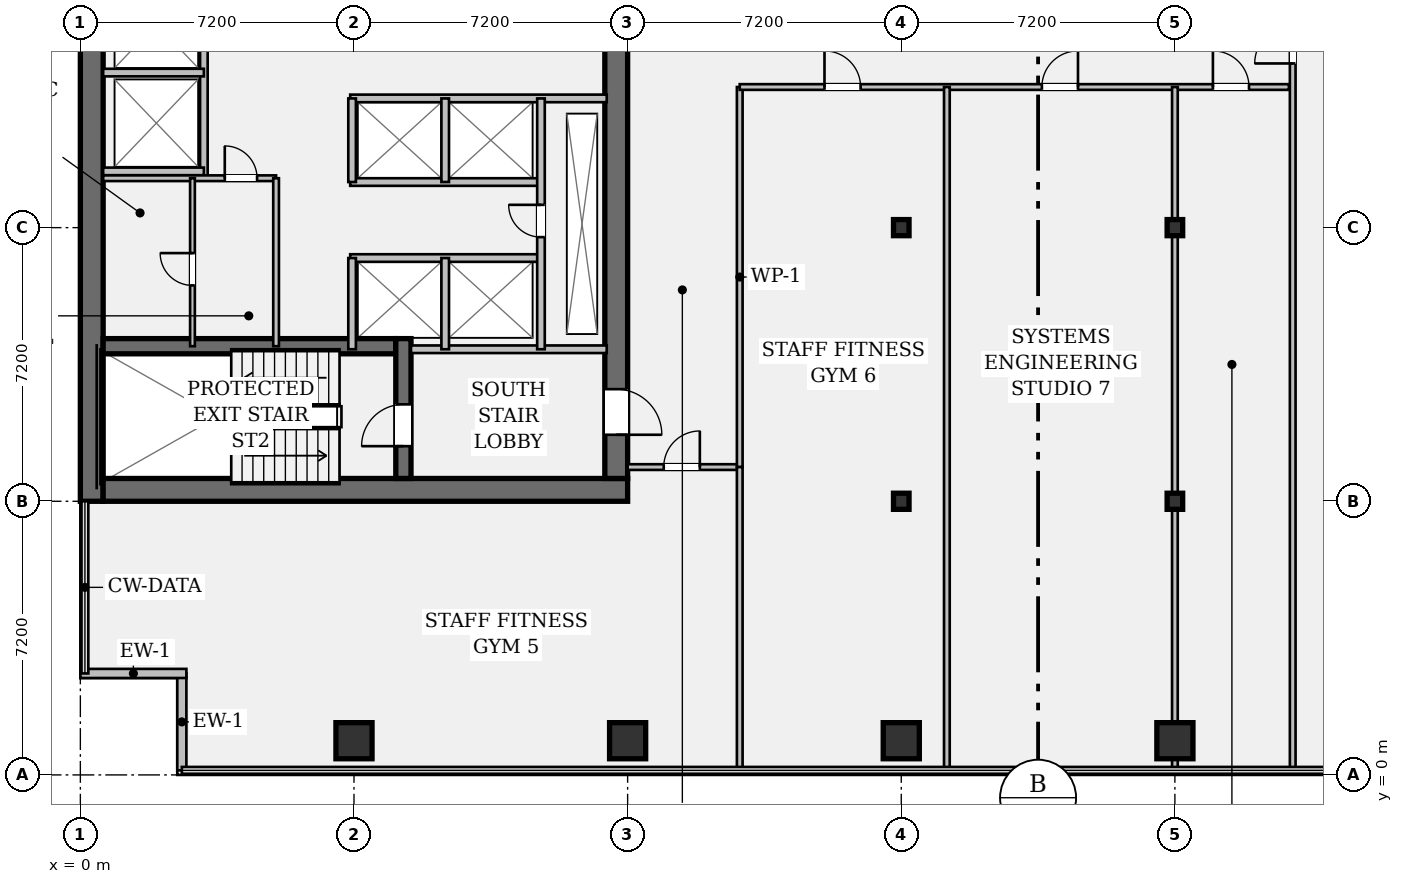
"""IFC4 building model, lengths in metres.
Left out: names, types, materials, properties, quantities, classifications, styles, units other than length and angle.
Written with IfcOpenShell. Run it as: python <this file> out.ifc"""

import sys

from ifc_helpers import new_model, si_unit, direction, frame, frame_2d, origin, origin_2d, place, context, subcontext, project, spatial, rectangle, hollow_rectangle, i_section, extrude, element, fill, save


model = new_model("IFC4")
c1 = context("Model", 3, precision=1e-05, world=origin(), true_north=direction((0.0, 1.0)))
c2 = subcontext(c1, "Body", "Model", "MODEL_VIEW")
j1 = project(units=[si_unit("LENGTHUNIT", "METRE"), si_unit("PLANEANGLEUNIT", "RADIAN")], contexts=[c1])
p1 = place(None, origin())
s1 = spatial("IfcSite", under=j1, at=p1, CompositionType="ELEMENT")
p2 = place(p1, origin())
s2 = spatial("IfcBuilding", under=s1, at=p2, CompositionType="ELEMENT")
p3 = place(p2, frame((0.0, 0.0, 77.35)))
s3 = spatial("IfcBuildingStorey", under=s2, at=p3, CompositionType="ELEMENT", Elevation=77.35)
p4 = place(p3, frame((0.3, 7.2, 0.0), z_axis=(0.0, 0.0, 1.0), x_axis=(0.0, 1.0, 0.0)))
e1 = element("IfcWall", 1, at=p4, inside=s3, PredefinedType="SHEAR", context=c2, shape_type="SweptSolid", body=[
    extrude(rectangle(XDim=28.8, YDim=0.6, at=frame_2d((14.4, 0.0))), origin(), (0.0, 0.0, 1.0), 3.57),
])
p5 = place(p3, frame((0.6, 7.5, 0.0), z_axis=(0.0, 0.0, 1.0), x_axis=(1.0, 0.0, 0.0)))
e2 = element("IfcWall", 2, at=p5, inside=s3, PredefinedType="SHEAR", context=c2, shape_type="SweptSolid", body=[
    extrude(rectangle(XDim=13.8, YDim=0.6, at=frame_2d((6.9, 0.0))), origin(), (0.0, 0.0, 1.0), 3.57),
])
p6 = place(p3, frame((14.1, 35.4, 0.0), z_axis=(0.0, 0.0, 1.0), x_axis=(0.0, -1.0, 0.0)))
e3 = element("IfcWall", 3, at=p6, inside=s3, PredefinedType="SHEAR", context=c2, shape_type="SweptSolid", body=[
    extrude(rectangle(XDim=27.6, YDim=0.6, at=frame_2d((13.8, 0.0))), origin(), (0.0, 0.0, 1.0), 3.57),
])
p7 = place(p6, frame((1.3, 0.0, 0.0)))
e4 = element("IfcOpeningElement", 4, at=p7, cuts=e3, PredefinedType="OPENING", context=c2, shape_type="SweptSolid", body=[
    extrude(rectangle(XDim=1.2, YDim=2.15, at=frame_2d((0.6, 1.075))), frame((0.0, 0.312, 0.0), z_axis=(0.0, -1.0, 0.0), x_axis=(1.0, 0.0, 0.0)), (0.0, 0.0, 1.0), 0.624),
])
p8 = place(p6, frame((25.25, 0.0, 0.0)))
e5 = element("IfcOpeningElement", 5, at=p8, cuts=e3, PredefinedType="OPENING", context=c2, shape_type="SweptSolid", body=[
    extrude(rectangle(XDim=1.2, YDim=2.15, at=frame_2d((0.6, 1.075))), frame((0.0, 0.312, 0.0), z_axis=(0.0, -1.0, 0.0), x_axis=(1.0, 0.0, 0.0)), (0.0, 0.0, 1.0), 0.624),
])
p9 = place(p6, frame((14.6, 0.0, 0.0)))
e6 = element("IfcOpeningElement", 6, at=p9, cuts=e3, PredefinedType="OPENING", context=c2, shape_type="SweptSolid", body=[
    extrude(rectangle(XDim=1.6, YDim=2.2, at=frame_2d((0.8, 1.1))), frame((0.0, 0.312, 0.0), z_axis=(0.0, -1.0, 0.0), x_axis=(1.0, 0.0, 0.0)), (0.0, 0.0, 1.0), 0.624),
])
p10 = place(p3, frame((0.6, 11.28, 0.0), z_axis=(0.0, 0.0, 1.0), x_axis=(1.0, 0.0, 0.0)))
e7 = element("IfcWall", 7, at=p10, inside=s3, PredefinedType="SHEAR", context=c2, shape_type="SweptSolid", body=[
    extrude(rectangle(XDim=7.7, YDim=0.4, at=frame_2d((3.85, 0.0))), origin(), (0.0, 0.0, 1.0), 3.57),
])
p11 = place(p3, frame((8.5, 7.8, 0.0), z_axis=(0.0, 0.0, 1.0), x_axis=(0.0, 1.0, 0.0)))
e8 = element("IfcWall", 8, at=p11, inside=s3, PredefinedType="SHEAR", context=c2, shape_type="SweptSolid", body=[
    extrude(rectangle(XDim=3.68, YDim=0.4, at=frame_2d((1.84, 0.0))), origin(), (0.0, 0.0, 1.0), 3.57),
])
p12 = place(p11, frame((0.85, 0.0, 0.0)))
e9 = element("IfcOpeningElement", 9, at=p12, cuts=e8, PredefinedType="OPENING", context=c2, shape_type="SweptSolid", body=[
    extrude(rectangle(XDim=1.1, YDim=2.15, at=frame_2d((0.55, 1.075))), frame((0.0, 0.212, 0.0), z_axis=(0.0, -1.0, 0.0), x_axis=(1.0, 0.0, 0.0)), (0.0, 0.0, 1.0), 0.424),
])
for number, where, z_axis, x_axis in (
    (10, (7.2, 0.9, 0.0), (0.0, 0.0, 1.0), (1.0, 0.0, 0.0)),
    (11, (14.4, 0.9, 0.0), (0.0, 0.0, 1.0), (1.0, 0.0, 0.0)),
    (12, (21.6, 0.9, 0.0), (0.0, 0.0, 1.0), (1.0, 0.0, 0.0)),
):
    element("IfcColumn", number, at=place(p3, frame(where, z_axis=z_axis, x_axis=x_axis)), inside=s3, PredefinedType="COLUMN", context=c2, shape_type="SweptSolid", body=[
        extrude(hollow_rectangle(XDim=0.95, YDim=0.95, WallThickness=0.06, at=origin_2d()), origin(), (0.0, 0.0, 1.0), 3.57),
    ])
for number, where, z_axis, x_axis in (
    (13, (21.6, 7.2, 0.0), (0.0, 0.0, 1.0), (1.0, 0.0, 0.0)),
    (14, (21.6, 14.4, 0.0), (0.0, 0.0, 1.0), (1.0, 0.0, 0.0)),
):
    element("IfcColumn", number, at=place(p3, frame(where, z_axis=z_axis, x_axis=x_axis)), inside=s3, PredefinedType="COLUMN", context=c2, shape_type="SweptSolid", body=[
        extrude(i_section(OverallWidth=0.409, OverallDepth=0.424, WebThickness=0.033, FlangeThickness=0.052, FilletRadius=0.018, at=origin_2d()), origin(), (0.0, 0.0, 1.0), 3.57),
    ])
p13 = place(p3, frame((28.8, 0.9, 0.0), z_axis=(0.0, 0.0, 1.0), x_axis=(1.0, 0.0, 0.0)))
e15 = element("IfcColumn", 15, at=p13, inside=s3, PredefinedType="COLUMN", context=c2, shape_type="SweptSolid", body=[
    extrude(hollow_rectangle(XDim=0.95, YDim=0.95, WallThickness=0.06, at=origin_2d()), origin(), (0.0, 0.0, 1.0), 3.57),
])
for number, where, z_axis, x_axis in (
    (16, (28.8, 7.2, 0.0), (0.0, 0.0, 1.0), (1.0, 0.0, 0.0)),
    (17, (28.8, 14.4, 0.0), (0.0, 0.0, 1.0), (1.0, 0.0, 0.0)),
):
    element("IfcColumn", number, at=place(p3, frame(where, z_axis=z_axis, x_axis=x_axis)), inside=s3, PredefinedType="COLUMN", context=c2, shape_type="SweptSolid", body=[
        extrude(i_section(OverallWidth=0.409, OverallDepth=0.424, WebThickness=0.033, FlangeThickness=0.052, FilletRadius=0.018, at=origin_2d()), origin(), (0.0, 0.0, 1.0), 3.57),
    ])
p14 = place(p3, frame((2.67, 0.12, 0.0), z_axis=(0.0, 0.0, 1.0), x_axis=(0.0, 1.0, 0.0)))
e18 = element("IfcWall", 18, at=p14, inside=s3, PredefinedType="STANDARD", context=c2, shape_type="SweptSolid", body=[
    extrude(rectangle(XDim=2.55, YDim=0.24, at=frame_2d((1.275, 0.0))), origin(), (0.0, 0.0, 1.0), 3.57),
])
p15 = place(p3, frame((2.79, 2.67, 0.0), z_axis=(0.0, 0.0, 1.0), x_axis=(-1.0, 0.0, 0.0)))
e19 = element("IfcWall", 19, at=p15, inside=s3, PredefinedType="STANDARD", context=c2, shape_type="SweptSolid", body=[
    extrude(rectangle(XDim=2.79, YDim=0.24, at=frame_2d((1.395, 0.0))), origin(), (0.0, 0.0, 1.0), 3.57),
])
p16 = place(p3, frame((8.7, 11.2, 0.0), z_axis=(0.0, 0.0, 1.0), x_axis=(1.0, 0.0, 0.0)))
e20 = element("IfcWall", 20, at=p16, inside=s3, PredefinedType="PARTITIONING", context=c2, shape_type="SweptSolid", body=[
    extrude(rectangle(XDim=5.15, YDim=0.2, at=frame_2d((2.575, 0.0))), origin(), (0.0, 0.0, 1.0), 3.57),
])
p17 = place(p3, frame((3.25, 15.7, 0.0), z_axis=(0.0, 0.0, 1.0), x_axis=(0.0, 1.0, 0.0)))
e21 = element("IfcWall", 21, at=p17, inside=s3, PredefinedType="PARTITIONING", context=c2, shape_type="SweptSolid", body=[
    extrude(rectangle(XDim=13.08, YDim=0.2, at=frame_2d((6.54, 0.0))), origin(), (0.0, 0.0, 1.0), 3.57),
])
for number, where, z_axis, x_axis in (
    (22, (0.6, 15.88, 0.0), (0.0, 0.0, 1.0), (1.0, 0.0, 0.0)),
    (23, (0.6, 18.48, 0.0), (0.0, 0.0, 1.0), (1.0, 0.0, 0.0)),
):
    element("IfcWall", number, at=place(p3, frame(where, z_axis=z_axis, x_axis=x_axis)), inside=s3, PredefinedType="PARTITIONING", context=c2, shape_type="SweptSolid", body=[
        extrude(rectangle(XDim=2.65, YDim=0.2, at=frame_2d((1.325, 0.0))), origin(), (0.0, 0.0, 1.0), 3.57),
    ])
p18 = place(p3, frame((7.1, 17.8, 0.0), z_axis=(0.0, 0.0, 1.0), x_axis=(1.0, 0.0, 0.0)))
e24 = element("IfcWall", 24, at=p18, inside=s3, PredefinedType="PARTITIONING", context=c2, shape_type="SweptSolid", body=[
    extrude(rectangle(XDim=6.75, YDim=0.2, at=frame_2d((3.375, 0.0))), origin(), (0.0, 0.0, 1.0), 3.57),
])
for number, where, z_axis, x_axis in (
    (25, (7.1, 15.6, 0.0), (0.0, 0.0, 1.0), (1.0, 0.0, 0.0)),
    (26, (7.1, 13.6, 0.0), (0.0, 0.0, 1.0), (1.0, 0.0, 0.0)),
):
    element("IfcWall", number, at=place(p3, frame(where, z_axis=z_axis, x_axis=x_axis)), inside=s3, PredefinedType="PARTITIONING", context=c2, shape_type="SweptSolid", body=[
        extrude(rectangle(XDim=5.02, YDim=0.2, at=frame_2d((2.51, 0.0))), origin(), (0.0, 0.0, 1.0), 3.57),
    ])
p19 = place(p3, frame((7.15, 15.6, 0.0), z_axis=(0.0, 0.0, 1.0), x_axis=(0.0, 1.0, 0.0)))
e27 = element("IfcWall", 27, at=p19, inside=s3, PredefinedType="PARTITIONING", context=c2, shape_type="SweptSolid", body=[
    extrude(rectangle(XDim=2.2, YDim=0.2, at=frame_2d((1.1, 0.0))), origin(), (0.0, 0.0, 1.0), 3.57),
])
p20 = place(p3, frame((7.15, 11.2, 0.0), z_axis=(0.0, 0.0, 1.0), x_axis=(0.0, 1.0, 0.0)))
e28 = element("IfcWall", 28, at=p20, inside=s3, PredefinedType="PARTITIONING", context=c2, shape_type="SweptSolid", body=[
    extrude(rectangle(XDim=2.4, YDim=0.2, at=frame_2d((1.2, 0.0))), origin(), (0.0, 0.0, 1.0), 3.57),
])
p21 = place(p3, frame((9.6, 15.6, 0.0), z_axis=(0.0, 0.0, 1.0), x_axis=(0.0, 1.0, 0.0)))
e29 = element("IfcWall", 29, at=p21, inside=s3, PredefinedType="PARTITIONING", context=c2, shape_type="SweptSolid", body=[
    extrude(rectangle(XDim=2.2, YDim=0.2, at=frame_2d((1.1, 0.0))), origin(), (0.0, 0.0, 1.0), 3.57),
])
p22 = place(p3, frame((9.6, 11.2, 0.0), z_axis=(0.0, 0.0, 1.0), x_axis=(0.0, 1.0, 0.0)))
e30 = element("IfcWall", 30, at=p22, inside=s3, PredefinedType="PARTITIONING", context=c2, shape_type="SweptSolid", body=[
    extrude(rectangle(XDim=2.4, YDim=0.2, at=frame_2d((1.2, 0.0))), origin(), (0.0, 0.0, 1.0), 3.57),
])
p23 = place(p3, frame((12.12, 11.2, 0.0), z_axis=(0.0, 0.0, 1.0), x_axis=(0.0, 1.0, 0.0)))
e31 = element("IfcWall", 31, at=p23, inside=s3, PredefinedType="PARTITIONING", context=c2, shape_type="SweptSolid", body=[
    extrude(rectangle(XDim=6.6, YDim=0.2, at=frame_2d((3.3, 0.0))), origin(), (0.0, 0.0, 1.0), 3.57),
])
p24 = place(p23, frame((2.95, 0.0, 0.0)))
e32 = element("IfcOpeningElement", 32, at=p24, cuts=e31, PredefinedType="OPENING", context=c2, shape_type="SweptSolid", body=[
    extrude(rectangle(XDim=0.85, YDim=2.15, at=frame_2d((0.425, 1.075))), frame((0.0, 0.112, 0.0), z_axis=(0.0, -1.0, 0.0), x_axis=(1.0, 0.0, 0.0)), (0.0, 0.0, 1.0), 0.224),
])
p25 = place(p3, frame((0.6, 15.7, 0.0), z_axis=(0.0, 0.0, 1.0), x_axis=(1.0, 0.0, 0.0)))
e33 = element("IfcWall", 33, at=p25, inside=s3, PredefinedType="PARTITIONING", context=c2, shape_type="SweptSolid", body=[
    extrude(rectangle(XDim=4.55, YDim=0.15, at=frame_2d((2.275, 0.0))), origin(), (0.0, 0.0, 1.0), 3.57),
])
p26 = place(p25, frame((3.2, 0.0, 0.0)))
e34 = element("IfcOpeningElement", 34, at=p26, cuts=e33, PredefinedType="OPENING", context=c2, shape_type="SweptSolid", body=[
    extrude(rectangle(XDim=0.85, YDim=2.15, at=frame_2d((0.425, 1.075))), frame((0.0, 0.087, 0.0), z_axis=(0.0, -1.0, 0.0), x_axis=(1.0, 0.0, 0.0)), (0.0, 0.0, 1.0), 0.174),
])
p27 = place(p3, frame((5.15, 11.28, 0.0), z_axis=(0.0, 0.0, 1.0), x_axis=(0.0, 1.0, 0.0)))
e35 = element("IfcWall", 35, at=p27, inside=s3, PredefinedType="PARTITIONING", context=c2, shape_type="SweptSolid", body=[
    extrude(rectangle(XDim=4.42, YDim=0.15, at=frame_2d((2.21, 0.0))), origin(), (0.0, 0.0, 1.0), 3.57),
])
p28 = place(p3, frame((2.95, 11.28, 0.0), z_axis=(0.0, 0.0, 1.0), x_axis=(0.0, 1.0, 0.0)))
e36 = element("IfcWall", 36, at=p28, inside=s3, PredefinedType="PARTITIONING", context=c2, shape_type="SweptSolid", body=[
    extrude(rectangle(XDim=4.42, YDim=0.125, at=frame_2d((2.21, 0.0))), origin(), (0.0, 0.0, 1.0), 3.57),
])
p29 = place(p28, frame((1.6, 0.0, 0.0)))
e37 = element("IfcOpeningElement", 37, at=p29, cuts=e36, PredefinedType="OPENING", context=c2, shape_type="SweptSolid", body=[
    extrude(rectangle(XDim=0.85, YDim=2.15, at=frame_2d((0.425, 1.075))), frame((0.0, 0.074, 0.0), z_axis=(0.0, -1.0, 0.0), x_axis=(1.0, 0.0, 0.0)), (0.0, 0.0, 1.0), 0.149),
])
p30 = place(p3, frame((14.4, 8.1, 0.0), z_axis=(0.0, 0.0, 1.0), x_axis=(1.0, 0.0, 0.0)))
e38 = element("IfcWall", 38, at=p30, inside=s3, PredefinedType="PARTITIONING", context=c2, shape_type="SweptSolid", body=[
    extrude(rectangle(XDim=2.95, YDim=0.15, at=frame_2d((1.475, 0.0))), origin(), (0.0, 0.0, 1.0), 3.088),
])
p31 = place(p30, frame((0.95, 0.0, 0.0)))
e39 = element("IfcOpeningElement", 39, at=p31, cuts=e38, PredefinedType="OPENING", context=c2, shape_type="SweptSolid", body=[
    extrude(rectangle(XDim=0.95, YDim=2.15, at=frame_2d((0.475, 1.075))), frame((0.0, 0.087, 0.0), z_axis=(0.0, -1.0, 0.0), x_axis=(1.0, 0.0, 0.0)), (0.0, 0.0, 1.0), 0.174),
])
p32 = place(p3, frame((17.35, 8.1, 0.0), z_axis=(0.0, 0.0, 1.0), x_axis=(0.0, 1.0, 0.0)))
e40 = element("IfcWall", 40, at=p32, inside=s3, PredefinedType="PARTITIONING", context=c2, shape_type="SweptSolid", body=[
    extrude(rectangle(XDim=10.0, YDim=0.15, at=frame_2d((5.0, 0.0))), origin(), (0.0, 0.0, 1.0), 2.783),
])
p33 = place(p3, frame((17.35, 18.1, 0.0), z_axis=(0.0, 0.0, 1.0), x_axis=(1.0, 0.0, 0.0)))
e41 = element("IfcWall", 41, at=p33, inside=s3, PredefinedType="PARTITIONING", context=c2, shape_type="SweptSolid", body=[
    extrude(rectangle(XDim=14.45, YDim=0.15, at=frame_2d((7.225, 0.0))), origin(), (0.0, 0.0, 1.0), 2.783),
])
p34 = place(p33, frame((2.23, 0.0, 0.0)))
e42 = element("IfcOpeningElement", 42, at=p34, cuts=e41, PredefinedType="OPENING", context=c2, shape_type="SweptSolid", body=[
    extrude(rectangle(XDim=0.95, YDim=2.15, at=frame_2d((0.475, 1.075))), frame((0.0, 0.087, 0.0), z_axis=(0.0, -1.0, 0.0), x_axis=(1.0, 0.0, 0.0)), (0.0, 0.0, 1.0), 0.174),
])
p35 = place(p33, frame((7.95, 0.0, 0.0)))
e43 = element("IfcOpeningElement", 43, at=p35, cuts=e41, PredefinedType="OPENING", context=c2, shape_type="SweptSolid", body=[
    extrude(rectangle(XDim=0.95, YDim=2.15, at=frame_2d((0.475, 1.075))), frame((0.0, 0.087, 0.0), z_axis=(0.0, -1.0, 0.0), x_axis=(1.0, 0.0, 0.0)), (0.0, 0.0, 1.0), 0.174),
])
p36 = place(p33, frame((12.45, 0.0, 0.0)))
e44 = element("IfcOpeningElement", 44, at=p36, cuts=e41, PredefinedType="OPENING", context=c2, shape_type="SweptSolid", body=[
    extrude(rectangle(XDim=0.95, YDim=2.15, at=frame_2d((0.475, 1.075))), frame((0.0, 0.087, 0.0), z_axis=(0.0, -1.0, 0.0), x_axis=(1.0, 0.0, 0.0)), (0.0, 0.0, 1.0), 0.174),
])
p37 = place(p3, frame((31.9, 0.12, 0.0), z_axis=(0.0, 0.0, 1.0), x_axis=(0.0, 1.0, 0.0)))
e45 = element("IfcWall", 45, at=p37, inside=s3, PredefinedType="PARTITIONING", context=c2, shape_type="SweptSolid", body=[
    extrude(rectangle(XDim=24.96, YDim=0.15, at=frame_2d((12.48, 0.0))), origin(), (0.0, 0.0, 1.0), 2.783),
])
p38 = place(p37, frame((18.6, 0.0, 0.0)))
e46 = element("IfcOpeningElement", 46, at=p38, cuts=e45, PredefinedType="OPENING", context=c2, shape_type="SweptSolid", body=[
    extrude(rectangle(XDim=1.0, YDim=2.15, at=frame_2d((0.5, 1.075))), frame((0.0, 0.087, 0.0), z_axis=(0.0, -1.0, 0.0), x_axis=(1.0, 0.0, 0.0)), (0.0, 0.0, 1.0), 0.174),
])
p39 = place(p3, frame((17.35, 0.12, 0.0), z_axis=(0.0, 0.0, 1.0), x_axis=(0.0, 1.0, 0.0)))
e47 = element("IfcWall", 47, at=p39, inside=s3, PredefinedType="PARTITIONING", context=c2, shape_type="SweptSolid", body=[
    extrude(rectangle(XDim=7.98, YDim=0.15, at=frame_2d((3.99, 0.0))), origin(), (0.0, 0.0, 1.0), 2.783),
])
for number, where, z_axis, x_axis in (
    (48, (22.8, 0.12, 0.0), (0.0, 0.0, 1.0), (0.0, 1.0, 0.0)),
    (49, (28.8, 0.12, 0.0), (0.0, 0.0, 1.0), (0.0, 1.0, 0.0)),
):
    element("IfcWall", number, at=place(p3, frame(where, z_axis=z_axis, x_axis=x_axis)), inside=s3, PredefinedType="PARTITIONING", context=c2, shape_type="SweptSolid", body=[
        extrude(rectangle(XDim=17.98, YDim=0.15, at=frame_2d((8.99, 0.0))), origin(), (0.0, 0.0, 1.0), 2.783),
    ])
p40 = place(p12, origin())
e50 = element("IfcDoor", 50, at=p40, inside=s3, OperationType="SINGLE_SWING_LEFT", PredefinedType="DOOR", context=c2, shape_type="SweptSolid", body=[
    extrude(rectangle(XDim=1.1, YDim=2.15, at=frame_2d((0.55, 1.075))), frame((0.0, 0.025, 0.0), z_axis=(0.0, -1.0, 0.0), x_axis=(1.0, 0.0, 0.0)), (0.0, 0.0, 1.0), 0.05),
])
fill(e9, e50)
p41 = place(p8, origin())
e51 = element("IfcDoor", 51, at=p41, inside=s3, OperationType="SINGLE_SWING_RIGHT", PredefinedType="DOOR", context=c2, shape_type="SweptSolid", body=[
    extrude(rectangle(XDim=1.2, YDim=2.15, at=frame_2d((0.6, 1.075))), frame((0.0, 0.025, 0.0), z_axis=(0.0, -1.0, 0.0), x_axis=(1.0, 0.0, 0.0)), (0.0, 0.0, 1.0), 0.05),
])
fill(e5, e51)
p42 = place(p24, origin())
e52 = element("IfcDoor", 52, at=p42, inside=s3, OperationType="SINGLE_SWING_RIGHT", PredefinedType="DOOR", context=c2, shape_type="SweptSolid", body=[
    extrude(rectangle(XDim=0.85, YDim=2.15, at=frame_2d((0.425, 1.075))), frame((0.0, 0.025, 0.0), z_axis=(0.0, -1.0, 0.0), x_axis=(1.0, 0.0, 0.0)), (0.0, 0.0, 1.0), 0.05),
])
fill(e32, e52)
p43 = place(p26, origin())
e53 = element("IfcDoor", 53, at=p43, inside=s3, OperationType="SINGLE_SWING_LEFT", PredefinedType="DOOR", context=c2, shape_type="SweptSolid", body=[
    extrude(rectangle(XDim=0.85, YDim=2.15, at=frame_2d((0.425, 1.075))), frame((0.0, 0.025, 0.0), z_axis=(0.0, -1.0, 0.0), x_axis=(1.0, 0.0, 0.0)), (0.0, 0.0, 1.0), 0.05),
])
fill(e34, e53)
p44 = place(p29, origin())
e54 = element("IfcDoor", 54, at=p44, inside=s3, OperationType="SINGLE_SWING_RIGHT", PredefinedType="DOOR", context=c2, shape_type="SweptSolid", body=[
    extrude(rectangle(XDim=0.85, YDim=2.15, at=frame_2d((0.425, 1.075))), frame((0.0, 0.025, 0.0), z_axis=(0.0, -1.0, 0.0), x_axis=(1.0, 0.0, 0.0)), (0.0, 0.0, 1.0), 0.05),
])
fill(e37, e54)
p45 = place(p31, origin())
e55 = element("IfcDoor", 55, at=p45, inside=s3, OperationType="SINGLE_SWING_RIGHT", PredefinedType="DOOR", context=c2, shape_type="SweptSolid", body=[
    extrude(rectangle(XDim=0.95, YDim=2.15, at=frame_2d((0.475, 1.075))), frame((0.0, 0.025, 0.0), z_axis=(0.0, -1.0, 0.0), x_axis=(1.0, 0.0, 0.0)), (0.0, 0.0, 1.0), 0.05),
])
fill(e39, e55)
p46 = place(p34, origin())
e56 = element("IfcDoor", 56, at=p46, inside=s3, OperationType="SINGLE_SWING_LEFT", PredefinedType="DOOR", context=c2, shape_type="SweptSolid", body=[
    extrude(rectangle(XDim=0.95, YDim=2.15, at=frame_2d((0.475, 1.075))), frame((0.0, 0.025, 0.0), z_axis=(0.0, -1.0, 0.0), x_axis=(1.0, 0.0, 0.0)), (0.0, 0.0, 1.0), 0.05),
])
fill(e42, e56)
p47 = place(p35, origin())
e57 = element("IfcDoor", 57, at=p47, inside=s3, OperationType="SINGLE_SWING_RIGHT", PredefinedType="DOOR", context=c2, shape_type="SweptSolid", body=[
    extrude(rectangle(XDim=0.95, YDim=2.15, at=frame_2d((0.475, 1.075))), frame((0.0, 0.025, 0.0), z_axis=(0.0, -1.0, 0.0), x_axis=(1.0, 0.0, 0.0)), (0.0, 0.0, 1.0), 0.05),
])
fill(e43, e57)
p48 = place(p36, origin())
e58 = element("IfcDoor", 58, at=p48, inside=s3, OperationType="SINGLE_SWING_LEFT", PredefinedType="DOOR", context=c2, shape_type="SweptSolid", body=[
    extrude(rectangle(XDim=0.95, YDim=2.15, at=frame_2d((0.475, 1.075))), frame((0.0, 0.025, 0.0), z_axis=(0.0, -1.0, 0.0), x_axis=(1.0, 0.0, 0.0)), (0.0, 0.0, 1.0), 0.05),
])
fill(e44, e58)
p49 = place(p38, origin())
e59 = element("IfcDoor", 59, at=p49, inside=s3, OperationType="SINGLE_SWING_LEFT", PredefinedType="DOOR", context=c2, shape_type="SweptSolid", body=[
    extrude(rectangle(XDim=1.0, YDim=2.15, at=frame_2d((0.5, 1.075))), frame((0.0, 0.025, 0.0), z_axis=(0.0, -1.0, 0.0), x_axis=(1.0, 0.0, 0.0)), (0.0, 0.0, 1.0), 0.05),
])
fill(e46, e59)
save(model, sys.argv[1])
